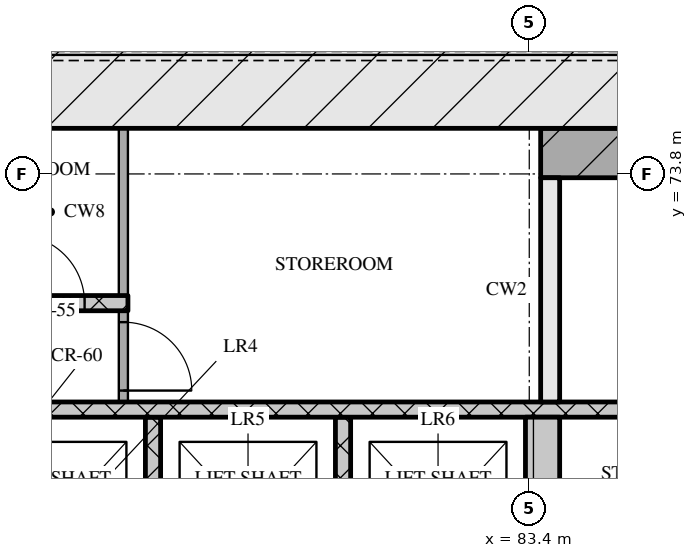
"""IFC4 building model, lengths in metres.
Left out: names, types, materials, properties, quantities, classifications, styles, units other than length and angle.
Written with IfcOpenShell. Run it as: python <this file> out.ifc"""

import sys

from ifc_helpers import new_model, si_unit, direction, frame, frame_2d, origin, place, context, subcontext, project, spatial, rectangle, extrude, element, fill, save


model = new_model("IFC4")
c1 = context("Model", 3, precision=1e-05, world=origin(), true_north=direction((0.0, 1.0)))
c2 = subcontext(c1, "Body", "Model", "MODEL_VIEW")
j1 = project(units=[si_unit("LENGTHUNIT", "METRE"), si_unit("PLANEANGLEUNIT", "RADIAN")], contexts=[c1])
p1 = place(None, origin())
s1 = spatial("IfcSite", under=j1, at=p1, CompositionType="ELEMENT")
p2 = place(p1, origin())
s2 = spatial("IfcBuilding", under=s1, at=p2, CompositionType="ELEMENT")
p3 = place(p2, frame((0.0, 0.0, 73.2)))
s3 = spatial("IfcBuildingStorey", under=s2, at=p3, CompositionType="ELEMENT", Elevation=73.2)
p4 = place(p3, frame((66.6, 75.0, 0.0), z_axis=(0.0, 0.0, 1.0), x_axis=(1.0, 0.0, 0.0)))
e1 = element("IfcWall", 1, at=p4, inside=s3, PredefinedType="SOLIDWALL", context=c2, shape_type="SweptSolid", body=[
    extrude(rectangle(XDim=42.0, YDim=1.2, at=frame_2d((21.0, 0.0))), origin(), (0.0, 0.0, 1.0), 3.32),
])
for number, where, z_axis, x_axis in (
    (2, (78.45, 68.0, 0.0), (0.0, 0.0, 1.0), (0.0, 1.0, 0.0)),
    (3, (80.95, 68.0, 0.0), (0.0, 0.0, 1.0), (0.0, 1.0, 0.0)),
):
    element("IfcWall", number, at=place(p3, frame(where, z_axis=z_axis, x_axis=x_axis)), inside=s3, PredefinedType="SOLIDWALL", context=c2, shape_type="SweptSolid", body=[
        extrude(rectangle(XDim=2.6, YDim=0.2, at=frame_2d((1.3, 0.0))), origin(), (0.0, 0.0, 1.0), 3.32),
    ])
p5 = place(p3, frame((83.575, 68.0, 0.0), z_axis=(0.0, 0.0, 1.0), x_axis=(0.0, 1.0, 0.0)))
e4 = element("IfcWall", 4, at=p5, inside=s3, PredefinedType="SOLIDWALL", context=c2, shape_type="SweptSolid", body=[
    extrude(rectangle(XDim=2.6, YDim=0.45, at=frame_2d((1.3, 0.0))), origin(), (0.0, 0.0, 1.0), 3.32),
])
p6 = place(p3, frame((67.8, 70.7, 0.0), z_axis=(0.0, 0.0, 1.0), x_axis=(1.0, 0.0, 0.0)))
e5 = element("IfcWall", 5, at=p6, inside=s3, PredefinedType="SOLIDWALL", context=c2, shape_type="SweptSolid", body=[
    extrude(rectangle(XDim=39.6, YDim=0.2, at=frame_2d((19.8, 0.0))), origin(), (0.0, 0.0, 1.0), 3.32),
])
p7 = place(p6, frame((0.65, 0.0, 0.0)))
e6 = element("IfcOpeningElement", 6, at=p7, cuts=e5, PredefinedType="OPENING", context=c2, shape_type="SweptSolid", body=[
    extrude(rectangle(XDim=1.1, YDim=2.1, at=frame_2d((0.55, 1.05))), frame((0.0, 0.11, 0.0), z_axis=(0.0, -1.0, 0.0), x_axis=(1.0, 0.0, 0.0)), (0.0, 0.0, 1.0), 0.22),
])
p8 = place(p6, frame((3.25, 0.0, 0.0)))
e7 = element("IfcOpeningElement", 7, at=p8, cuts=e5, PredefinedType="OPENING", context=c2, shape_type="SweptSolid", body=[
    extrude(rectangle(XDim=1.1, YDim=2.1, at=frame_2d((0.55, 1.05))), frame((0.0, 0.11, 0.0), z_axis=(0.0, -1.0, 0.0), x_axis=(1.0, 0.0, 0.0)), (0.0, 0.0, 1.0), 0.22),
])
p9 = place(p6, frame((5.9, 0.0, 0.0)))
e8 = element("IfcOpeningElement", 8, at=p9, cuts=e5, PredefinedType="OPENING", context=c2, shape_type="SweptSolid", body=[
    extrude(rectangle(XDim=1.0, YDim=2.1, at=frame_2d((0.5, 1.05))), frame((0.0, 0.11, 0.0), z_axis=(0.0, -1.0, 0.0), x_axis=(1.0, 0.0, 0.0)), (0.0, 0.0, 1.0), 0.22),
])
p10 = place(p6, frame((21.7, 0.0, 0.0)))
e9 = element("IfcOpeningElement", 9, at=p10, cuts=e5, PredefinedType="OPENING", context=c2, shape_type="SweptSolid", body=[
    extrude(rectangle(XDim=1.0, YDim=2.1, at=frame_2d((0.5, 1.05))), frame((0.0, 0.11, 0.0), z_axis=(0.0, -1.0, 0.0), x_axis=(1.0, 0.0, 0.0)), (0.0, 0.0, 1.0), 0.22),
])
p11 = place(p6, frame((32.7, 0.0, 0.0)))
e10 = element("IfcOpeningElement", 10, at=p11, cuts=e5, PredefinedType="OPENING", context=c2, shape_type="SweptSolid", body=[
    extrude(rectangle(XDim=1.0, YDim=2.1, at=frame_2d((0.5, 1.05))), frame((0.0, 0.11, 0.0), z_axis=(0.0, -1.0, 0.0), x_axis=(1.0, 0.0, 0.0)), (0.0, 0.0, 1.0), 0.22),
])
p12 = place(p6, frame((35.25, 0.0, 0.0)))
e11 = element("IfcOpeningElement", 11, at=p12, cuts=e5, PredefinedType="OPENING", context=c2, shape_type="SweptSolid", body=[
    extrude(rectangle(XDim=1.1, YDim=2.1, at=frame_2d((0.55, 1.05))), frame((0.0, 0.11, 0.0), z_axis=(0.0, -1.0, 0.0), x_axis=(1.0, 0.0, 0.0)), (0.0, 0.0, 1.0), 0.22),
])
p13 = place(p6, frame((37.85, 0.0, 0.0)))
e12 = element("IfcOpeningElement", 12, at=p13, cuts=e5, PredefinedType="OPENING", context=c2, shape_type="SweptSolid", body=[
    extrude(rectangle(XDim=1.1, YDim=2.1, at=frame_2d((0.55, 1.05))), frame((0.0, 0.11, 0.0), z_axis=(0.0, -1.0, 0.0), x_axis=(1.0, 0.0, 0.0)), (0.0, 0.0, 1.0), 0.22),
])
p14 = place(p3, frame((78.06, 70.8, 0.0), z_axis=(0.0, 0.0, 1.0), x_axis=(0.0, 1.0, 0.0)))
e13 = element("IfcWall", 13, at=p14, inside=s3, PredefinedType="PARTITIONING", context=c2, shape_type="SweptSolid", body=[
    extrude(rectangle(XDim=1.2, YDim=0.12, at=frame_2d((0.6, 0.0))), origin(), (0.0, 0.0, 1.0), 3.32),
])
p15 = place(p14, frame((0.15, 0.0, 0.0)))
e14 = element("IfcOpeningElement", 14, at=p15, cuts=e13, PredefinedType="OPENING", context=c2, shape_type="SweptSolid", body=[
    extrude(rectangle(XDim=0.9, YDim=2.1, at=frame_2d((0.45, 1.05))), frame((0.0, 0.07, 0.0), z_axis=(0.0, -1.0, 0.0), x_axis=(1.0, 0.0, 0.0)), (0.0, 0.0, 1.0), 0.14),
])
p16 = place(p3, frame((83.675, 70.8, 0.0), z_axis=(0.0, 0.0, 1.0), x_axis=(0.0, 1.0, 0.0)))
e15 = element("IfcWall", 15, at=p16, inside=s3, PredefinedType="SOLIDWALL", context=c2, shape_type="SweptSolid", body=[
    extrude(rectangle(XDim=2.95, YDim=0.25, at=frame_2d((1.475, 0.0))), origin(), (0.0, 0.0, 1.0), 3.32),
])
p17 = place(p3, frame((72.8, 72.1, 0.0), z_axis=(0.0, 0.0, 1.0), x_axis=(1.0, 0.0, 0.0)))
e16 = element("IfcWall", 16, at=p17, inside=s3, PredefinedType="SOLIDWALL", context=c2, shape_type="SweptSolid", body=[
    extrude(rectangle(XDim=5.32, YDim=0.2, at=frame_2d((2.66, 0.0))), origin(), (0.0, 0.0, 1.0), 3.32),
])
p18 = place(p17, frame((1.25, 0.0, 0.0)))
e17 = element("IfcOpeningElement", 17, at=p18, cuts=e16, PredefinedType="OPENING", context=c2, shape_type="SweptSolid", body=[
    extrude(rectangle(XDim=0.9, YDim=2.1, at=frame_2d((0.45, 1.05))), frame((0.0, 0.11, 0.0), z_axis=(0.0, -1.0, 0.0), x_axis=(1.0, 0.0, 0.0)), (0.0, 0.0, 1.0), 0.22),
])
p19 = place(p17, frame((3.85, 0.0, 0.0)))
e18 = element("IfcOpeningElement", 18, at=p19, cuts=e16, PredefinedType="OPENING", context=c2, shape_type="SweptSolid", body=[
    extrude(rectangle(XDim=0.9, YDim=2.1, at=frame_2d((0.45, 1.05))), frame((0.0, 0.11, 0.0), z_axis=(0.0, -1.0, 0.0), x_axis=(1.0, 0.0, 0.0)), (0.0, 0.0, 1.0), 0.22),
])
p20 = place(p3, frame((78.06, 72.2, 0.0), z_axis=(0.0, 0.0, 1.0), x_axis=(0.0, 1.0, 0.0)))
e19 = element("IfcWall", 19, at=p20, inside=s3, PredefinedType="PARTITIONING", context=c2, shape_type="SweptSolid", body=[
    extrude(rectangle(XDim=2.2, YDim=0.12, at=frame_2d((1.1, 0.0))), origin(), (0.0, 0.0, 1.0), 3.32),
])
p21 = place(p3, frame((83.55, 74.075, 0.0), z_axis=(0.0, 0.0, 1.0), x_axis=(1.0, 0.0, 0.0)))
e20 = element("IfcWall", 20, at=p21, inside=s3, PredefinedType="SOLIDWALL", context=c2, shape_type="SweptSolid", body=[
    extrude(rectangle(XDim=8.1, YDim=0.65, at=frame_2d((4.05, 0.0))), origin(), (0.0, 0.0, 1.0), 3.32),
])
p22 = place(p15, origin())
e21 = element("IfcDoor", 21, at=p22, inside=s3, OperationType="SINGLE_SWING_RIGHT", PredefinedType="DOOR", context=c2, shape_type="SweptSolid", body=[
    extrude(rectangle(XDim=0.9, YDim=2.1, at=frame_2d((0.45, 1.05))), frame((0.0, 0.025, 0.0), z_axis=(0.0, -1.0, 0.0), x_axis=(1.0, 0.0, 0.0)), (0.0, 0.0, 1.0), 0.05),
])
fill(e14, e21)
p23 = place(p19, origin())
e22 = element("IfcDoor", 22, at=p23, inside=s3, OperationType="SINGLE_SWING_LEFT", PredefinedType="DOOR", context=c2, shape_type="SweptSolid", body=[
    extrude(rectangle(XDim=0.9, YDim=2.1, at=frame_2d((0.45, 1.05))), frame((0.0, 0.025, 0.0), z_axis=(0.0, -1.0, 0.0), x_axis=(1.0, 0.0, 0.0)), (0.0, 0.0, 1.0), 0.05),
])
fill(e18, e22)
save(model, sys.argv[1])
